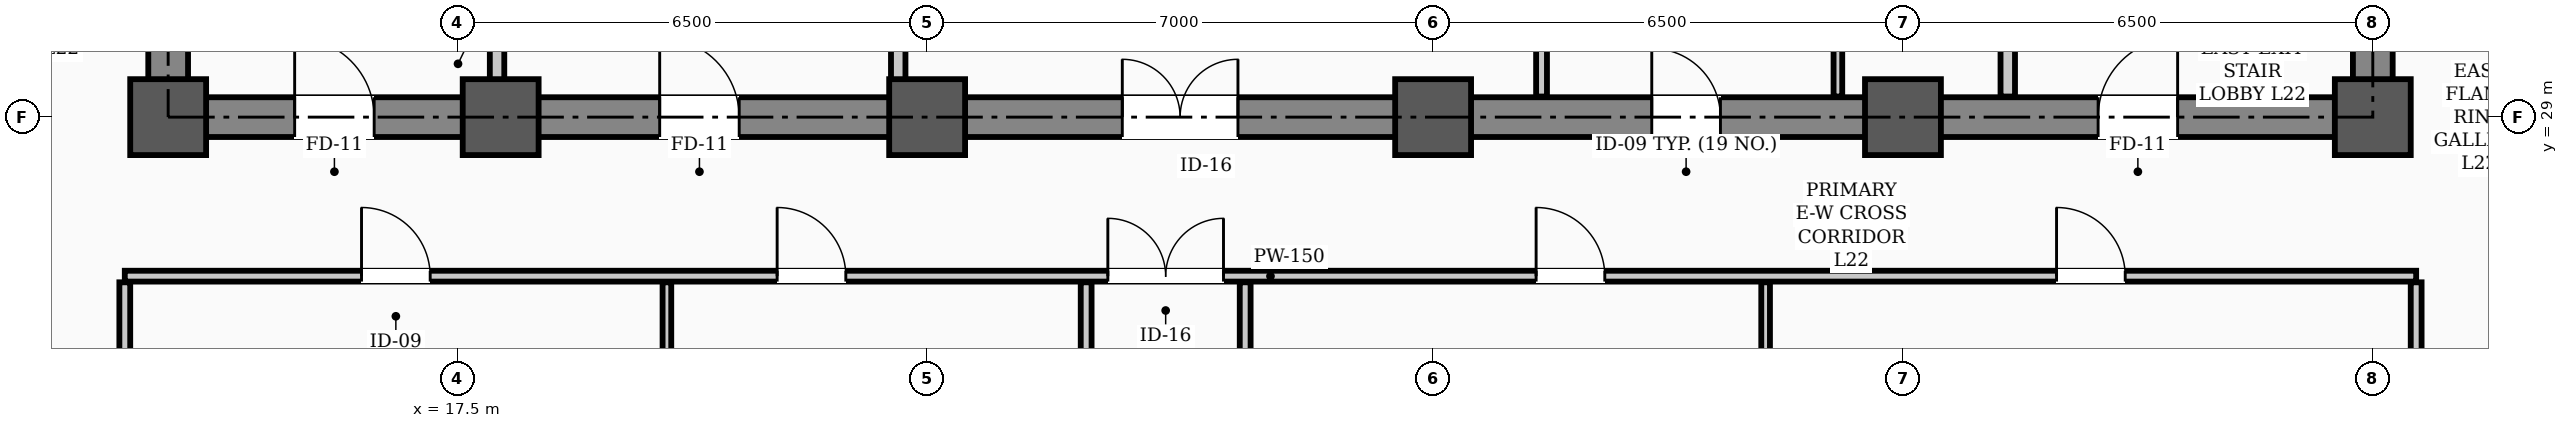
"""IFC4 building model, lengths in metres.
Left out: names, types, materials, properties, quantities, classifications, styles, units other than length and angle.
Written with IfcOpenShell. Run it as: python <this file> out.ifc"""

import sys

from ifc_helpers import new_model, si_unit, direction, frame, frame_2d, origin, origin_2d, place, context, subcontext, project, spatial, rectangle, hollow_rectangle, extrude, element, fill, save


model = new_model("IFC4")
c1 = context("Model", 3, precision=1e-05, world=origin(), true_north=direction((0.0, 1.0)))
c2 = subcontext(c1, "Body", "Model", "MODEL_VIEW")
j1 = project(units=[si_unit("LENGTHUNIT", "METRE"), si_unit("PLANEANGLEUNIT", "RADIAN")], contexts=[c1])
p1 = place(None, origin())
s1 = spatial("IfcSite", under=j1, at=p1, CompositionType="ELEMENT")
p2 = place(p1, origin())
s2 = spatial("IfcBuilding", under=s1, at=p2, CompositionType="ELEMENT")
p3 = place(p2, frame((0.0, 0.0, 88.9)))
s3 = spatial("IfcBuildingStorey", under=s2, at=p3, CompositionType="ELEMENT", Elevation=88.9)
for number, where, z_axis, x_axis in (
    (1, (13.5, 29.0, 0.0), (0.0, 0.0, 1.0), (1.0, 0.0, 0.0)),
    (2, (18.1, 29.0, 0.0), (0.0, 0.0, 1.0), (1.0, 0.0, 0.0)),
    (3, (24.0, 29.0, 0.0), (0.0, 0.0, 1.0), (1.0, 0.0, 0.0)),
    (4, (31.0, 29.0, 0.0), (0.0, 0.0, 1.0), (1.0, 0.0, 0.0)),
    (5, (37.5, 29.0, 0.0), (0.0, 0.0, 1.0), (1.0, 0.0, 0.0)),
    (6, (44.0, 29.0, 0.0), (0.0, 0.0, 1.0), (1.0, 0.0, 0.0)),
):
    element("IfcColumn", number, at=place(p3, frame(where, z_axis=z_axis, x_axis=x_axis)), inside=s3, PredefinedType="COLUMN", context=c2, shape_type="SweptSolid", body=[
        extrude(hollow_rectangle(XDim=1.05, YDim=1.05, WallThickness=0.038, InnerFilletRadius=0.019, OuterFilletRadius=0.057, at=origin_2d()), origin(), (0.0, 0.0, 1.0), 3.9),
    ])
p4 = place(p3, frame((13.5, 29.0, 0.0), z_axis=(0.0, 0.0, 1.0), x_axis=(1.0, 0.0, 0.0)))
e7 = element("IfcWall", 7, at=p4, inside=s3, PredefinedType="SHEAR", context=c2, shape_type="SweptSolid", body=[
    extrude(rectangle(XDim=30.5, YDim=0.55, at=frame_2d((15.25, 0.0))), origin(), (0.0, 0.0, 1.0), 3.72),
])
p5 = place(p4, frame((1.75, 0.0, 0.0)))
e8 = element("IfcOpeningElement", 8, at=p5, cuts=e7, PredefinedType="OPENING", context=c2, shape_type="SweptSolid", body=[
    extrude(rectangle(XDim=1.1, YDim=2.08, at=frame_2d((0.55, 1.04))), frame((0.0, 0.285, 0.0), z_axis=(0.0, -1.0, 0.0), x_axis=(1.0, 0.0, 0.0)), (0.0, 0.0, 1.0), 0.57),
])
p6 = place(p4, frame((26.7, 0.0, 0.0)))
e9 = element("IfcOpeningElement", 9, at=p6, cuts=e7, PredefinedType="OPENING", context=c2, shape_type="SweptSolid", body=[
    extrude(rectangle(XDim=1.1, YDim=2.08, at=frame_2d((0.55, 1.04))), frame((0.0, 0.285, 0.0), z_axis=(0.0, -1.0, 0.0), x_axis=(1.0, 0.0, 0.0)), (0.0, 0.0, 1.0), 0.57),
])
p7 = place(p4, frame((6.8, 0.0, 0.0)))
e10 = element("IfcOpeningElement", 10, at=p7, cuts=e7, PredefinedType="OPENING", context=c2, shape_type="SweptSolid", body=[
    extrude(rectangle(XDim=1.1, YDim=2.08, at=frame_2d((0.55, 1.04))), frame((0.0, 0.285, 0.0), z_axis=(0.0, -1.0, 0.0), x_axis=(1.0, 0.0, 0.0)), (0.0, 0.0, 1.0), 0.57),
])
p8 = place(p4, frame((13.2, 0.0, 0.0)))
e11 = element("IfcOpeningElement", 11, at=p8, cuts=e7, PredefinedType="OPENING", context=c2, shape_type="SweptSolid", body=[
    extrude(rectangle(XDim=1.6, YDim=2.08, at=frame_2d((0.8, 1.04))), frame((0.0, 0.285, 0.0), z_axis=(0.0, -1.0, 0.0), x_axis=(1.0, 0.0, 0.0)), (0.0, 0.0, 1.0), 0.57),
])
p9 = place(p4, frame((20.525, 0.0, 0.0)))
e12 = element("IfcOpeningElement", 12, at=p9, cuts=e7, PredefinedType="OPENING", context=c2, shape_type="SweptSolid", body=[
    extrude(rectangle(XDim=0.95, YDim=2.08, at=frame_2d((0.475, 1.04))), frame((0.0, 0.285, 0.0), z_axis=(0.0, -1.0, 0.0), x_axis=(1.0, 0.0, 0.0)), (0.0, 0.0, 1.0), 0.57),
])
for number, where, z_axis, x_axis in (
    (13, (13.5, 29.35, 0.0), (0.0, 0.0, 1.0), (0.0, 1.0, 0.0)),
    (14, (44.0, 29.35, 0.0), (0.0, 0.0, 1.0), (0.0, 1.0, 0.0)),
):
    element("IfcWall", number, at=place(p3, frame(where, z_axis=z_axis, x_axis=x_axis)), inside=s3, PredefinedType="SHEAR", context=c2, shape_type="SweptSolid", body=[
        extrude(rectangle(XDim=8.6, YDim=0.55, at=frame_2d((4.3, 0.0))), origin(), (0.0, 0.0, 1.0), 3.72),
    ])
p10 = place(p3, frame((12.9, 26.8, 0.0), z_axis=(0.0, 0.0, 1.0), x_axis=(1.0, 0.0, 0.0)))
e15 = element("IfcWall", 15, at=p10, inside=s3, PredefinedType="PARTITIONING", context=c2, shape_type="SweptSolid", body=[
    extrude(rectangle(XDim=31.7, YDim=0.15, at=frame_2d((15.85, 0.0))), origin(), (0.0, 0.0, 1.0), 3.1),
])
p11 = place(p10, frame((13.6, 0.0, 0.0)))
e16 = element("IfcOpeningElement", 16, at=p11, cuts=e15, PredefinedType="OPENING", context=c2, shape_type="SweptSolid", body=[
    extrude(rectangle(XDim=1.6, YDim=2.08, at=frame_2d((0.8, 1.04))), frame((0.0, 0.085, 0.0), z_axis=(0.0, -1.0, 0.0), x_axis=(1.0, 0.0, 0.0)), (0.0, 0.0, 1.0), 0.17),
])
p12 = place(p10, frame((3.275, 0.0, 0.0)))
e17 = element("IfcOpeningElement", 17, at=p12, cuts=e15, PredefinedType="OPENING", context=c2, shape_type="SweptSolid", body=[
    extrude(rectangle(XDim=0.95, YDim=2.08, at=frame_2d((0.475, 1.04))), frame((0.0, 0.085, 0.0), z_axis=(0.0, -1.0, 0.0), x_axis=(1.0, 0.0, 0.0)), (0.0, 0.0, 1.0), 0.17),
])
p13 = place(p10, frame((9.025, 0.0, 0.0)))
e18 = element("IfcOpeningElement", 18, at=p13, cuts=e15, PredefinedType="OPENING", context=c2, shape_type="SweptSolid", body=[
    extrude(rectangle(XDim=0.95, YDim=2.08, at=frame_2d((0.475, 1.04))), frame((0.0, 0.085, 0.0), z_axis=(0.0, -1.0, 0.0), x_axis=(1.0, 0.0, 0.0)), (0.0, 0.0, 1.0), 0.17),
])
p14 = place(p10, frame((19.525, 0.0, 0.0)))
e19 = element("IfcOpeningElement", 19, at=p14, cuts=e15, PredefinedType="OPENING", context=c2, shape_type="SweptSolid", body=[
    extrude(rectangle(XDim=0.95, YDim=2.08, at=frame_2d((0.475, 1.04))), frame((0.0, 0.085, 0.0), z_axis=(0.0, -1.0, 0.0), x_axis=(1.0, 0.0, 0.0)), (0.0, 0.0, 1.0), 0.17),
])
p15 = place(p10, frame((26.725, 0.0, 0.0)))
e20 = element("IfcOpeningElement", 20, at=p15, cuts=e15, PredefinedType="OPENING", context=c2, shape_type="SweptSolid", body=[
    extrude(rectangle(XDim=0.95, YDim=2.08, at=frame_2d((0.475, 1.04))), frame((0.0, 0.085, 0.0), z_axis=(0.0, -1.0, 0.0), x_axis=(1.0, 0.0, 0.0)), (0.0, 0.0, 1.0), 0.17),
])
for number, where, z_axis, x_axis in (
    (21, (18.05, 29.285, 0.0), (0.0, 0.0, 1.0), (0.0, 1.0, 0.0)),
    (22, (38.95, 29.285, 0.0), (0.0, 0.0, 1.0), (0.0, 1.0, 0.0)),
):
    element("IfcWall", number, at=place(p3, frame(where, z_axis=z_axis, x_axis=x_axis)), inside=s3, PredefinedType="STANDARD", context=c2, shape_type="SweptSolid", body=[
        extrude(rectangle(XDim=1.015, YDim=0.2, at=frame_2d((0.508, 0.0))), origin(), (0.0, 0.0, 1.0), 3.3),
    ])
p16 = place(p3, frame((23.6, 29.285, 0.0), z_axis=(0.0, 0.0, 1.0), x_axis=(0.0, 1.0, 0.0)))
e23 = element("IfcWall", 23, at=p16, inside=s3, PredefinedType="STANDARD", context=c2, shape_type="SweptSolid", body=[
    extrude(rectangle(XDim=5.415, YDim=0.2, at=frame_2d((2.708, 0.0))), origin(), (0.0, 0.0, 1.0), 3.1),
])
p17 = place(p3, frame((32.5, 29.285, 0.0), z_axis=(0.0, 0.0, 1.0), x_axis=(0.0, 1.0, 0.0)))
e24 = element("IfcWall", 24, at=p17, inside=s3, PredefinedType="PARTITIONING", context=c2, shape_type="SweptSolid", body=[
    extrude(rectangle(XDim=2.48, YDim=0.15, at=frame_2d((1.24, 0.0))), origin(), (0.0, 0.0, 1.0), 3.3),
])
p18 = place(p3, frame((36.6, 29.285, 0.0), z_axis=(0.0, 0.0, 1.0), x_axis=(0.0, 1.0, 0.0)))
e25 = element("IfcWall", 25, at=p18, inside=s3, PredefinedType="PARTITIONING", context=c2, shape_type="SweptSolid", body=[
    extrude(rectangle(XDim=2.48, YDim=0.12, at=frame_2d((1.24, 0.0))), origin(), (0.0, 0.0, 1.0), 3.3),
])
for number, where, z_axis, x_axis in (
    (26, (26.2, 19.335, 0.0), (0.0, 0.0, 1.0), (0.0, 1.0, 0.0)),
    (27, (28.4, 19.335, 0.0), (0.0, 0.0, 1.0), (0.0, 1.0, 0.0)),
    (28, (12.9, 19.335, 0.0), (0.0, 0.0, 1.0), (0.0, 1.0, 0.0)),
    (29, (44.6, 19.335, 0.0), (0.0, 0.0, 1.0), (0.0, 1.0, 0.0)),
):
    element("IfcWall", number, at=place(p3, frame(where, z_axis=z_axis, x_axis=x_axis)), inside=s3, PredefinedType="PARTITIONING", context=c2, shape_type="SweptSolid", body=[
        extrude(rectangle(XDim=7.38, YDim=0.15, at=frame_2d((3.69, 0.0))), origin(), (0.0, 0.0, 1.0), 3.0),
    ])
for number, where, z_axis, x_axis in (
    (30, (20.4, 19.335, 0.0), (0.0, 0.0, 1.0), (0.0, 1.0, 0.0)),
    (31, (35.6, 19.335, 0.0), (0.0, 0.0, 1.0), (0.0, 1.0, 0.0)),
):
    element("IfcWall", number, at=place(p3, frame(where, z_axis=z_axis, x_axis=x_axis)), inside=s3, PredefinedType="PARTITIONING", context=c2, shape_type="SweptSolid", body=[
        extrude(rectangle(XDim=7.38, YDim=0.12, at=frame_2d((3.69, 0.0))), origin(), (0.0, 0.0, 1.0), 3.0),
    ])
p19 = place(p5, origin())
e32 = element("IfcDoor", 32, at=p19, inside=s3, OperationType="SINGLE_SWING_LEFT", PredefinedType="DOOR", context=c2, shape_type="SweptSolid", body=[
    extrude(rectangle(XDim=1.1, YDim=2.08, at=frame_2d((0.55, 1.04))), frame((0.0, 0.025, 0.0), z_axis=(0.0, -1.0, 0.0), x_axis=(1.0, 0.0, 0.0)), (0.0, 0.0, 1.0), 0.05),
])
fill(e8, e32)
p20 = place(p6, origin())
e33 = element("IfcDoor", 33, at=p20, inside=s3, OperationType="SINGLE_SWING_RIGHT", PredefinedType="DOOR", context=c2, shape_type="SweptSolid", body=[
    extrude(rectangle(XDim=1.1, YDim=2.08, at=frame_2d((0.55, 1.04))), frame((0.0, 0.025, 0.0), z_axis=(0.0, -1.0, 0.0), x_axis=(1.0, 0.0, 0.0)), (0.0, 0.0, 1.0), 0.05),
])
fill(e9, e33)
p21 = place(p7, origin())
e34 = element("IfcDoor", 34, at=p21, inside=s3, OperationType="SINGLE_SWING_LEFT", PredefinedType="DOOR", context=c2, shape_type="SweptSolid", body=[
    extrude(rectangle(XDim=1.1, YDim=2.08, at=frame_2d((0.55, 1.04))), frame((0.0, 0.025, 0.0), z_axis=(0.0, -1.0, 0.0), x_axis=(1.0, 0.0, 0.0)), (0.0, 0.0, 1.0), 0.05),
])
fill(e10, e34)
p22 = place(p8, origin())
e35 = element("IfcDoor", 35, at=p22, inside=s3, OperationType="DOUBLE_DOOR_SINGLE_SWING", PredefinedType="DOOR", context=c2, shape_type="SweptSolid", body=[
    extrude(rectangle(XDim=1.6, YDim=2.08, at=frame_2d((0.8, 1.04))), frame((0.0, 0.025, 0.0), z_axis=(0.0, -1.0, 0.0), x_axis=(1.0, 0.0, 0.0)), (0.0, 0.0, 1.0), 0.05),
])
fill(e11, e35)
p23 = place(p9, origin())
e36 = element("IfcDoor", 36, at=p23, inside=s3, OperationType="SINGLE_SWING_LEFT", PredefinedType="DOOR", context=c2, shape_type="SweptSolid", body=[
    extrude(rectangle(XDim=0.95, YDim=2.08, at=frame_2d((0.475, 1.04))), frame((0.0, 0.025, 0.0), z_axis=(0.0, -1.0, 0.0), x_axis=(1.0, 0.0, 0.0)), (0.0, 0.0, 1.0), 0.05),
])
fill(e12, e36)
p24 = place(p11, origin())
e37 = element("IfcDoor", 37, at=p24, inside=s3, OperationType="DOUBLE_DOOR_SINGLE_SWING", PredefinedType="DOOR", context=c2, shape_type="SweptSolid", body=[
    extrude(rectangle(XDim=1.6, YDim=2.08, at=frame_2d((0.8, 1.04))), frame((0.0, 0.025, 0.0), z_axis=(0.0, -1.0, 0.0), x_axis=(1.0, 0.0, 0.0)), (0.0, 0.0, 1.0), 0.05),
])
fill(e16, e37)
p25 = place(p12, origin())
e38 = element("IfcDoor", 38, at=p25, inside=s3, OperationType="SINGLE_SWING_LEFT", PredefinedType="DOOR", context=c2, shape_type="SweptSolid", body=[
    extrude(rectangle(XDim=0.95, YDim=2.08, at=frame_2d((0.475, 1.04))), frame((0.0, 0.025, 0.0), z_axis=(0.0, -1.0, 0.0), x_axis=(1.0, 0.0, 0.0)), (0.0, 0.0, 1.0), 0.05),
])
fill(e17, e38)
p26 = place(p13, origin())
e39 = element("IfcDoor", 39, at=p26, inside=s3, OperationType="SINGLE_SWING_LEFT", PredefinedType="DOOR", context=c2, shape_type="SweptSolid", body=[
    extrude(rectangle(XDim=0.95, YDim=2.08, at=frame_2d((0.475, 1.04))), frame((0.0, 0.025, 0.0), z_axis=(0.0, -1.0, 0.0), x_axis=(1.0, 0.0, 0.0)), (0.0, 0.0, 1.0), 0.05),
])
fill(e18, e39)
p27 = place(p14, origin())
e40 = element("IfcDoor", 40, at=p27, inside=s3, OperationType="SINGLE_SWING_LEFT", PredefinedType="DOOR", context=c2, shape_type="SweptSolid", body=[
    extrude(rectangle(XDim=0.95, YDim=2.08, at=frame_2d((0.475, 1.04))), frame((0.0, 0.025, 0.0), z_axis=(0.0, -1.0, 0.0), x_axis=(1.0, 0.0, 0.0)), (0.0, 0.0, 1.0), 0.05),
])
fill(e19, e40)
p28 = place(p15, origin())
e41 = element("IfcDoor", 41, at=p28, inside=s3, OperationType="SINGLE_SWING_LEFT", PredefinedType="DOOR", context=c2, shape_type="SweptSolid", body=[
    extrude(rectangle(XDim=0.95, YDim=2.08, at=frame_2d((0.475, 1.04))), frame((0.0, 0.025, 0.0), z_axis=(0.0, -1.0, 0.0), x_axis=(1.0, 0.0, 0.0)), (0.0, 0.0, 1.0), 0.05),
])
fill(e20, e41)
save(model, sys.argv[1])
